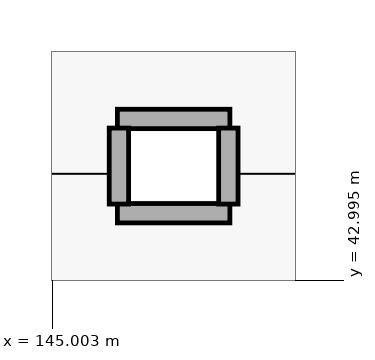
"""IFC4 building model, lengths in metres.
Left out: names, types, materials, properties, quantities, classifications, styles, units other than length and angle.
Written with IfcOpenShell. Run it as: python <this file> out.ifc"""

import sys

from ifc_helpers import new_model, si_unit, direction, frame, frame_2d, origin, place, context, subcontext, project, spatial, rectangle, extrude, element, save


model = new_model("IFC4")
c1 = context("Model", 3, precision=1e-05, world=origin(), true_north=direction((0.0, 1.0)))
c2 = subcontext(c1, "Body", "Model", "MODEL_VIEW")
j1 = project(units=[si_unit("LENGTHUNIT", "METRE"), si_unit("PLANEANGLEUNIT", "RADIAN")], contexts=[c1])
p1 = place(None, origin())
s1 = spatial("IfcSite", under=j1, at=p1, CompositionType="ELEMENT")
p2 = place(p1, origin())
s2 = spatial("IfcBuilding", under=s1, at=p2, CompositionType="ELEMENT")
p3 = place(p2, frame((0.0, 0.0, -4.8)))
s3 = spatial("IfcBuildingStorey", under=s2, at=p3, CompositionType="ELEMENT", Elevation=-4.8)
for number, where, z_axis, x_axis in (
    (1, (145.86, 45.12, 0.0), (0.0, 0.0, 1.0), (1.0, 0.0, 0.0)),
    (2, (145.86, 43.88, 0.0), (0.0, 0.0, 1.0), (1.0, 0.0, 0.0)),
):
    element("IfcWall", number, at=place(p3, frame(where, z_axis=z_axis, x_axis=x_axis)), inside=s3, PredefinedType="PARTITIONING", context=c2, shape_type="SweptSolid", body=[
        extrude(rectangle(XDim=1.48, YDim=0.255, at=frame_2d((0.74, 0.0))), origin(), (0.0, 0.0, 1.0), 4.36),
    ])
for number, where, z_axis, x_axis in (
    (3, (145.88, 44.0, 0.0), (0.0, 0.0, 1.0), (0.0, 1.0, 0.0)),
    (4, (147.32, 44.0, 0.0), (0.0, 0.0, 1.0), (0.0, 1.0, 0.0)),
):
    element("IfcWall", number, at=place(p3, frame(where, z_axis=z_axis, x_axis=x_axis)), inside=s3, PredefinedType="PARTITIONING", context=c2, shape_type="SweptSolid", body=[
        extrude(rectangle(XDim=1.0, YDim=0.255, at=frame_2d((0.5, 0.0))), origin(), (0.0, 0.0, 1.0), 4.36),
    ])
save(model, sys.argv[1])
